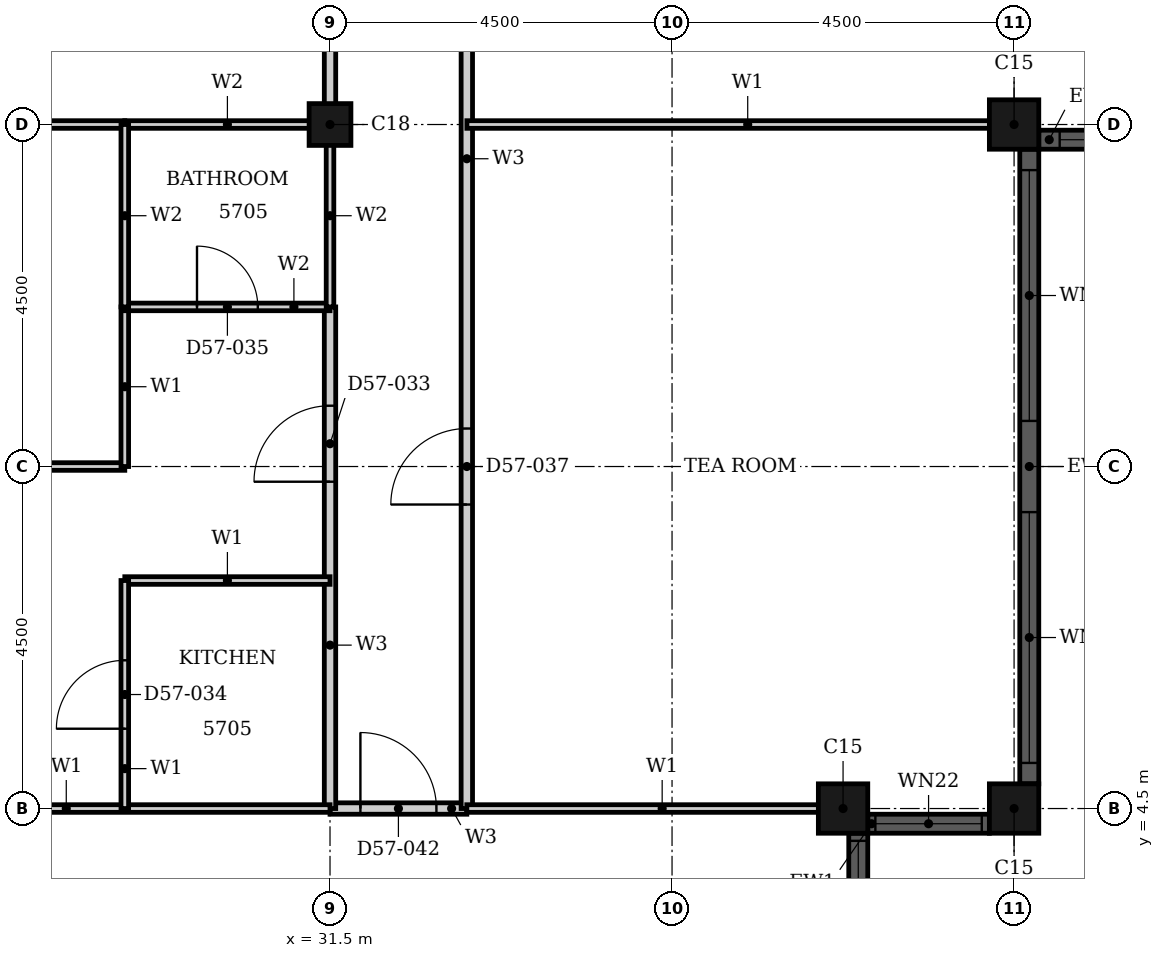
"""IFC4 building model, lengths in metres.
Left out: names, types, materials, properties, quantities, classifications, styles, units other than length and angle.
Written with IfcOpenShell. Run it as: python <this file> out.ifc"""

import sys

from ifc_helpers import new_model, si_unit, direction, frame, frame_2d, origin, origin_2d, place, context, subcontext, project, spatial, rectangle, hollow_rectangle, extrude, element, fill, save


model = new_model("IFC4")
c1 = context("Model", 3, precision=1e-05, world=origin(), true_north=direction((0.0, 1.0)))
c2 = subcontext(c1, "Body", "Model", "MODEL_VIEW")
j1 = project(units=[si_unit("LENGTHUNIT", "METRE"), si_unit("PLANEANGLEUNIT", "RADIAN")], contexts=[c1])
p1 = place(None, origin())
s1 = spatial("IfcSite", under=j1, at=p1, CompositionType="ELEMENT")
p2 = place(p1, origin())
s2 = spatial("IfcBuilding", under=s1, at=p2, CompositionType="ELEMENT")
p3 = place(p2, frame((0.0, 0.0, 225.7)))
s3 = spatial("IfcBuildingStorey", under=s2, at=p3, CompositionType="ELEMENT", Elevation=225.7)
for number, where, z_axis, x_axis in (
    (1, (40.5, 13.5, 0.0), (0.0, 0.0, 1.0), (1.0, 0.0, 0.0)),
    (2, (38.25, 4.5, 0.0), (0.0, 0.0, 1.0), (1.0, 0.0, 0.0)),
    (3, (40.5, 4.5, 0.0), (0.0, 0.0, 1.0), (1.0, 0.0, 0.0)),
):
    element("IfcColumn", number, at=place(p3, frame(where, z_axis=z_axis, x_axis=x_axis)), inside=s3, PredefinedType="COLUMN", context=c2, shape_type="SweptSolid", body=[
        extrude(hollow_rectangle(XDim=0.65, YDim=0.65, WallThickness=0.021, at=origin_2d()), origin(), (0.0, 0.0, 1.0), 3.7),
    ])
p4 = place(p3, frame((31.5, 13.5, 0.0), z_axis=(0.0, 0.0, 1.0), x_axis=(1.0, 0.0, 0.0)))
e4 = element("IfcColumn", 4, at=p4, inside=s3, PredefinedType="COLUMN", context=c2, shape_type="SweptSolid", body=[
    extrude(hollow_rectangle(XDim=0.55, YDim=0.55, WallThickness=0.018, at=origin_2d()), origin(), (0.0, 0.0, 1.0), 3.7),
])
p5 = place(p3, frame((40.825, 13.3, 0.0), z_axis=(0.0, 0.0, 1.0), x_axis=(1.0, 0.0, 0.0)))
e5 = element("IfcWall", 5, at=p5, inside=s3, PredefinedType="SOLIDWALL", context=c2, shape_type="SweptSolid", body=[
    extrude(rectangle(XDim=3.85, YDim=0.25, at=frame_2d((1.925, 0.0))), origin(), (0.0, 0.0, 1.0), 3.7),
])
p6 = place(p5, frame((0.275, 0.0, 0.45)))
e6 = element("IfcOpeningElement", 6, at=p6, cuts=e5, PredefinedType="OPENING", context=c2, shape_type="SweptSolid", body=[
    extrude(rectangle(XDim=3.3, YDim=2.3, at=frame_2d((1.65, 1.15))), frame((0.0, 0.135, 0.0), z_axis=(0.0, -1.0, 0.0), x_axis=(1.0, 0.0, 0.0)), (0.0, 0.0, 1.0), 0.27),
])
p7 = place(p3, frame((38.45, 2.575, 0.0), z_axis=(0.0, 0.0, 1.0), x_axis=(0.0, 1.0, 0.0)))
e7 = element("IfcWall", 7, at=p7, inside=s3, PredefinedType="SOLIDWALL", context=c2, shape_type="SweptSolid", body=[
    extrude(rectangle(XDim=1.6, YDim=0.25, at=frame_2d((0.8, 0.0))), origin(), (0.0, 0.0, 1.0), 3.7),
])
p8 = place(p7, frame((0.1, 0.0, 0.9)))
e8 = element("IfcOpeningElement", 8, at=p8, cuts=e7, PredefinedType="OPENING", context=c2, shape_type="SweptSolid", body=[
    extrude(rectangle(XDim=1.4, YDim=1.85, at=frame_2d((0.7, 0.925))), frame((0.0, 0.135, 0.0), z_axis=(0.0, -1.0, 0.0), x_axis=(1.0, 0.0, 0.0)), (0.0, 0.0, 1.0), 0.27),
])
p9 = place(p3, frame((38.575, 4.3, 0.0), z_axis=(0.0, 0.0, 1.0), x_axis=(1.0, 0.0, 0.0)))
e9 = element("IfcWall", 9, at=p9, inside=s3, PredefinedType="SOLIDWALL", context=c2, shape_type="SweptSolid", body=[
    extrude(rectangle(XDim=1.6, YDim=0.25, at=frame_2d((0.8, 0.0))), origin(), (0.0, 0.0, 1.0), 3.7),
])
p10 = place(p9, frame((0.1, 0.0, 0.9)))
e10 = element("IfcOpeningElement", 10, at=p10, cuts=e9, PredefinedType="OPENING", context=c2, shape_type="SweptSolid", body=[
    extrude(rectangle(XDim=1.4, YDim=1.85, at=frame_2d((0.7, 0.925))), frame((0.0, 0.135, 0.0), z_axis=(0.0, -1.0, 0.0), x_axis=(1.0, 0.0, 0.0)), (0.0, 0.0, 1.0), 0.27),
])
p11 = place(p3, frame((40.7, 4.825, 0.0), z_axis=(0.0, 0.0, 1.0), x_axis=(0.0, 1.0, 0.0)))
e11 = element("IfcWall", 11, at=p11, inside=s3, PredefinedType="SOLIDWALL", context=c2, shape_type="SweptSolid", body=[
    extrude(rectangle(XDim=8.35, YDim=0.25, at=frame_2d((4.175, 0.0))), origin(), (0.0, 0.0, 1.0), 3.7),
])
p12 = place(p11, frame((0.275, 0.0, 0.45)))
e12 = element("IfcOpeningElement", 12, at=p12, cuts=e11, PredefinedType="OPENING", context=c2, shape_type="SweptSolid", body=[
    extrude(rectangle(XDim=3.3, YDim=2.3, at=frame_2d((1.65, 1.15))), frame((0.0, 0.135, 0.0), z_axis=(0.0, -1.0, 0.0), x_axis=(1.0, 0.0, 0.0)), (0.0, 0.0, 1.0), 0.27),
])
p13 = place(p11, frame((4.775, 0.0, 0.45)))
e13 = element("IfcOpeningElement", 13, at=p13, cuts=e11, PredefinedType="OPENING", context=c2, shape_type="SweptSolid", body=[
    extrude(rectangle(XDim=3.3, YDim=2.3, at=frame_2d((1.65, 1.15))), frame((0.0, 0.135, 0.0), z_axis=(0.0, -1.0, 0.0), x_axis=(1.0, 0.0, 0.0)), (0.0, 0.0, 1.0), 0.27),
])
p14 = place(p3, frame((31.5, 4.5, 0.0), z_axis=(0.0, 0.0, 1.0), x_axis=(1.0, 0.0, 0.0)))
e14 = element("IfcWall", 14, at=p14, inside=s3, PredefinedType="PARTITIONING", context=c2, shape_type="SweptSolid", body=[
    extrude(rectangle(XDim=1.8, YDim=0.15, at=frame_2d((0.9, 0.0))), origin(), (0.0, 0.0, 1.0), 3.4),
])
p15 = place(p14, frame((0.4, 0.0, 0.0)))
e15 = element("IfcOpeningElement", 15, at=p15, cuts=e14, PredefinedType="OPENING", context=c2, shape_type="SweptSolid", body=[
    extrude(rectangle(XDim=1.0, YDim=2.1, at=frame_2d((0.5, 1.05))), frame((0.0, 0.085, 0.0), z_axis=(0.0, -1.0, 0.0), x_axis=(1.0, 0.0, 0.0)), (0.0, 0.0, 1.0), 0.17),
])
p16 = place(p3, frame((31.5, 4.5, 0.0), z_axis=(0.0, 0.0, 1.0), x_axis=(0.0, 1.0, 0.0)))
e16 = element("IfcWall", 16, at=p16, inside=s3, PredefinedType="PARTITIONING", context=c2, shape_type="SweptSolid", body=[
    extrude(rectangle(XDim=6.6, YDim=0.15, at=frame_2d((3.3, 0.0))), origin(), (0.0, 0.0, 1.0), 2.68),
])
p17 = place(p16, frame((4.3, 0.0, 0.0)))
e17 = element("IfcOpeningElement", 17, at=p17, cuts=e16, PredefinedType="OPENING", context=c2, shape_type="SweptSolid", body=[
    extrude(rectangle(XDim=1.0, YDim=2.2, at=frame_2d((0.5, 1.1))), frame((0.0, 0.085, 0.0), z_axis=(0.0, -1.0, 0.0), x_axis=(1.0, 0.0, 0.0)), (0.0, 0.0, 1.0), 0.17),
])
p18 = place(p3, frame((31.5, 13.5, 0.0), z_axis=(0.0, 0.0, 1.0), x_axis=(0.0, 1.0, 0.0)))
e18 = element("IfcWall", 18, at=p18, inside=s3, PredefinedType="PARTITIONING", context=c2, shape_type="SweptSolid", body=[
    extrude(rectangle(XDim=7.2, YDim=0.15, at=frame_2d((3.6, 0.0))), origin(), (0.0, 0.0, 1.0), 3.4),
])
p19 = place(p3, frame((33.3, 4.5, 0.0), z_axis=(0.0, 0.0, 1.0), x_axis=(0.0, 1.0, 0.0)))
e19 = element("IfcWall", 19, at=p19, inside=s3, PredefinedType="PARTITIONING", context=c2, shape_type="SweptSolid", body=[
    extrude(rectangle(XDim=16.199, YDim=0.15, at=frame_2d((8.1, 0.0))), origin(), (0.0, 0.0, 1.0), 3.4),
])
p20 = place(p19, frame((12.099, 0.0, 0.0)))
e20 = element("IfcOpeningElement", 20, at=p20, cuts=e19, PredefinedType="OPENING", context=c2, shape_type="SweptSolid", body=[
    extrude(rectangle(XDim=1.0, YDim=2.2, at=frame_2d((0.5, 1.1))), frame((0.0, 0.085, 0.0), z_axis=(0.0, -1.0, 0.0), x_axis=(1.0, 0.0, 0.0)), (0.0, 0.0, 1.0), 0.17),
])
p21 = place(p19, frame((4.0, 0.0, 0.0)))
e21 = element("IfcOpeningElement", 21, at=p21, cuts=e19, PredefinedType="OPENING", context=c2, shape_type="SweptSolid", body=[
    extrude(rectangle(XDim=1.0, YDim=2.1, at=frame_2d((0.5, 1.05))), frame((0.0, 0.085, 0.0), z_axis=(0.0, -1.0, 0.0), x_axis=(1.0, 0.0, 0.0)), (0.0, 0.0, 1.0), 0.17),
])
p22 = place(p3, frame((33.301, 13.5, 0.0), z_axis=(0.0, 0.0, 1.0), x_axis=(1.0, 0.0, 0.0)))
e22 = element("IfcWall", 22, at=p22, inside=s3, PredefinedType="PARTITIONING", context=c2, shape_type="SweptSolid", body=[
    extrude(rectangle(XDim=7.389, YDim=0.1, at=frame_2d((3.694, 0.0))), origin(), (0.0, 0.0, 1.0), 2.48),
])
p23 = place(p3, frame((22.31, 13.5, 0.0), z_axis=(0.0, 0.0, 1.0), x_axis=(1.0, 0.0, 0.0)))
e23 = element("IfcWall", 23, at=p23, inside=s3, PredefinedType="PARTITIONING", context=c2, shape_type="SweptSolid", body=[
    extrude(rectangle(XDim=6.49, YDim=0.1, at=frame_2d((3.245, 0.0))), origin(), (0.0, 0.0, 1.0), 2.48),
])
p24 = place(p3, frame((33.3, 4.5, 0.0), z_axis=(0.0, 0.0, 1.0), x_axis=(1.0, 0.0, 0.0)))
e24 = element("IfcWall", 24, at=p24, inside=s3, PredefinedType="PARTITIONING", context=c2, shape_type="SweptSolid", body=[
    extrude(rectangle(XDim=5.14, YDim=0.1, at=frame_2d((2.57, 0.0))), origin(), (0.0, 0.0, 1.0), 3.4),
])
p25 = place(p3, frame((24.56, 4.5, 0.0), z_axis=(0.0, 0.0, 1.0), x_axis=(1.0, 0.0, 0.0)))
e25 = element("IfcWall", 25, at=p25, inside=s3, PredefinedType="PARTITIONING", context=c2, shape_type="SweptSolid", body=[
    extrude(rectangle(XDim=6.94, YDim=0.1, at=frame_2d((3.47, 0.0))), origin(), (0.0, 0.0, 1.0), 3.4),
])
p26 = place(p3, frame((28.8, 7.5, 0.0), z_axis=(0.0, 0.0, 1.0), x_axis=(1.0, 0.0, 0.0)))
e26 = element("IfcWall", 26, at=p26, inside=s3, PredefinedType="PARTITIONING", context=c2, shape_type="SweptSolid", body=[
    extrude(rectangle(XDim=2.7, YDim=0.1, at=frame_2d((1.35, 0.0))), origin(), (0.0, 0.0, 1.0), 3.4),
])
p27 = place(p3, frame((22.235, 9.0, 0.0), z_axis=(0.0, 0.0, 1.0), x_axis=(1.0, 0.0, 0.0)))
e27 = element("IfcWall", 27, at=p27, inside=s3, PredefinedType="PARTITIONING", context=c2, shape_type="SweptSolid", body=[
    extrude(rectangle(XDim=6.565, YDim=0.1, at=frame_2d((3.282, 0.0))), origin(), (0.0, 0.0, 1.0), 3.4),
])
p28 = place(p27, frame((2.7, 0.0, 0.0)))
e28 = element("IfcOpeningElement", 28, at=p28, cuts=e27, PredefinedType="OPENING", context=c2, shape_type="SweptSolid", body=[
    extrude(rectangle(XDim=0.9, YDim=2.1, at=frame_2d((0.45, 1.05))), frame((0.0, 0.06, 0.0), z_axis=(0.0, -1.0, 0.0), x_axis=(1.0, 0.0, 0.0)), (0.0, 0.0, 1.0), 0.12),
])
p29 = place(p3, frame((28.8, 9.0, 0.0), z_axis=(0.0, 0.0, 1.0), x_axis=(0.0, 1.0, 0.0)))
e29 = element("IfcWall", 29, at=p29, inside=s3, PredefinedType="PARTITIONING", context=c2, shape_type="SweptSolid", body=[
    extrude(rectangle(XDim=2.1, YDim=0.1, at=frame_2d((1.05, 0.0))), origin(), (0.0, 0.0, 1.0), 3.4),
])
p30 = place(p3, frame((28.8, 4.5, 0.0), z_axis=(0.0, 0.0, 1.0), x_axis=(0.0, 1.0, 0.0)))
e30 = element("IfcWall", 30, at=p30, inside=s3, PredefinedType="PARTITIONING", context=c2, shape_type="SweptSolid", body=[
    extrude(rectangle(XDim=3.0, YDim=0.1, at=frame_2d((1.5, 0.0))), origin(), (0.0, 0.0, 1.0), 3.4),
])
p31 = place(p30, frame((1.05, 0.0, 0.0)))
e31 = element("IfcOpeningElement", 31, at=p31, cuts=e30, PredefinedType="OPENING", context=c2, shape_type="SweptSolid", body=[
    extrude(rectangle(XDim=0.9, YDim=2.1, at=frame_2d((0.45, 1.05))), frame((0.0, 0.06, 0.0), z_axis=(0.0, -1.0, 0.0), x_axis=(1.0, 0.0, 0.0)), (0.0, 0.0, 1.0), 0.12),
])
p32 = place(p3, frame((28.8, 11.1, 0.0), z_axis=(0.0, 0.0, 1.0), x_axis=(1.0, 0.0, 0.0)))
e32 = element("IfcWall", 32, at=p32, inside=s3, PredefinedType="PARTITIONING", context=c2, shape_type="SweptSolid", body=[
    extrude(rectangle(XDim=2.7, YDim=0.1, at=frame_2d((1.35, 0.0))), origin(), (0.0, 0.0, 1.0), 3.4),
])
p33 = place(p32, frame((0.95, 0.0, 0.0)))
e33 = element("IfcOpeningElement", 33, at=p33, cuts=e32, PredefinedType="OPENING", context=c2, shape_type="SweptSolid", body=[
    extrude(rectangle(XDim=0.8, YDim=2.1, at=frame_2d((0.4, 1.05))), frame((0.0, 0.06, 0.0), z_axis=(0.0, -1.0, 0.0), x_axis=(1.0, 0.0, 0.0)), (0.0, 0.0, 1.0), 0.12),
])
p34 = place(p3, frame((28.8, 13.5, 0.0), z_axis=(0.0, 0.0, 1.0), x_axis=(1.0, 0.0, 0.0)))
e34 = element("IfcWall", 34, at=p34, inside=s3, PredefinedType="PARTITIONING", context=c2, shape_type="SweptSolid", body=[
    extrude(rectangle(XDim=2.7, YDim=0.1, at=frame_2d((1.35, 0.0))), origin(), (0.0, 0.0, 1.0), 2.48),
])
p35 = place(p3, frame((28.8, 11.1, 0.0), z_axis=(0.0, 0.0, 1.0), x_axis=(0.0, 1.0, 0.0)))
e35 = element("IfcWall", 35, at=p35, inside=s3, PredefinedType="PARTITIONING", context=c2, shape_type="SweptSolid", body=[
    extrude(rectangle(XDim=2.4, YDim=0.1, at=frame_2d((1.2, 0.0))), origin(), (0.0, 0.0, 1.0), 3.4),
])
p36 = place(p3, frame((31.5, 11.1, 0.0), z_axis=(0.0, 0.0, 1.0), x_axis=(0.0, 1.0, 0.0)))
e36 = element("IfcWall", 36, at=p36, inside=s3, PredefinedType="PARTITIONING", context=c2, shape_type="SweptSolid", body=[
    extrude(rectangle(XDim=2.4, YDim=0.1, at=frame_2d((1.2, 0.0))), origin(), (0.0, 0.0, 1.0), 2.68),
])
p37 = place(p6, origin())
e37 = element("IfcWindow", 37, at=p37, inside=s3, PartitioningType="SINGLE_PANEL", PredefinedType="WINDOW", context=c2, shape_type="SweptSolid", body=[
    extrude(rectangle(XDim=3.3, YDim=2.3, at=frame_2d((1.65, 1.15))), frame((0.0, 0.03, 0.0), z_axis=(0.0, -1.0, 0.0), x_axis=(1.0, 0.0, 0.0)), (0.0, 0.0, 1.0), 0.06),
])
fill(e6, e37)
p38 = place(p8, origin())
e38 = element("IfcWindow", 38, at=p38, inside=s3, PartitioningType="SINGLE_PANEL", PredefinedType="WINDOW", context=c2, shape_type="SweptSolid", body=[
    extrude(rectangle(XDim=1.4, YDim=1.85, at=frame_2d((0.7, 0.925))), frame((0.0, 0.03, 0.0), z_axis=(0.0, -1.0, 0.0), x_axis=(1.0, 0.0, 0.0)), (0.0, 0.0, 1.0), 0.06),
])
fill(e8, e38)
p39 = place(p10, origin())
e39 = element("IfcWindow", 39, at=p39, inside=s3, PartitioningType="SINGLE_PANEL", PredefinedType="WINDOW", context=c2, shape_type="SweptSolid", body=[
    extrude(rectangle(XDim=1.4, YDim=1.85, at=frame_2d((0.7, 0.925))), frame((0.0, 0.03, 0.0), z_axis=(0.0, -1.0, 0.0), x_axis=(1.0, 0.0, 0.0)), (0.0, 0.0, 1.0), 0.06),
])
fill(e10, e39)
p40 = place(p12, origin())
e40 = element("IfcWindow", 40, at=p40, inside=s3, PartitioningType="SINGLE_PANEL", PredefinedType="WINDOW", context=c2, shape_type="SweptSolid", body=[
    extrude(rectangle(XDim=3.3, YDim=2.3, at=frame_2d((1.65, 1.15))), frame((0.0, 0.03, 0.0), z_axis=(0.0, -1.0, 0.0), x_axis=(1.0, 0.0, 0.0)), (0.0, 0.0, 1.0), 0.06),
])
fill(e12, e40)
p41 = place(p13, origin())
e41 = element("IfcWindow", 41, at=p41, inside=s3, PartitioningType="SINGLE_PANEL", PredefinedType="WINDOW", context=c2, shape_type="SweptSolid", body=[
    extrude(rectangle(XDim=3.3, YDim=2.3, at=frame_2d((1.65, 1.15))), frame((0.0, 0.03, 0.0), z_axis=(0.0, -1.0, 0.0), x_axis=(1.0, 0.0, 0.0)), (0.0, 0.0, 1.0), 0.06),
])
fill(e13, e41)
p42 = place(p17, origin())
e42 = element("IfcDoor", 42, at=p42, inside=s3, OperationType="SINGLE_SWING_RIGHT", PredefinedType="DOOR", context=c2, shape_type="SweptSolid", body=[
    extrude(rectangle(XDim=1.0, YDim=2.2, at=frame_2d((0.5, 1.1))), frame((0.0, 0.025, 0.0), z_axis=(0.0, -1.0, 0.0), x_axis=(1.0, 0.0, 0.0)), (0.0, 0.0, 1.0), 0.05),
])
fill(e17, e42)
p43 = place(p31, origin())
e43 = element("IfcDoor", 43, at=p43, inside=s3, OperationType="SINGLE_SWING_LEFT", PredefinedType="DOOR", context=c2, shape_type="SweptSolid", body=[
    extrude(rectangle(XDim=0.9, YDim=2.1, at=frame_2d((0.45, 1.05))), frame((0.0, 0.025, 0.0), z_axis=(0.0, -1.0, 0.0), x_axis=(1.0, 0.0, 0.0)), (0.0, 0.0, 1.0), 0.05),
])
fill(e31, e43)
p44 = place(p33, origin())
e44 = element("IfcDoor", 44, at=p44, inside=s3, OperationType="SINGLE_SWING_RIGHT", PredefinedType="DOOR", context=c2, shape_type="SweptSolid", body=[
    extrude(rectangle(XDim=0.8, YDim=2.1, at=frame_2d((0.4, 1.05))), frame((0.0, 0.025, 0.0), z_axis=(0.0, -1.0, 0.0), x_axis=(1.0, 0.0, 0.0)), (0.0, 0.0, 1.0), 0.05),
])
fill(e33, e44)
p45 = place(p21, origin())
e45 = element("IfcDoor", 45, at=p45, inside=s3, OperationType="SINGLE_SWING_RIGHT", PredefinedType="DOOR", context=c2, shape_type="SweptSolid", body=[
    extrude(rectangle(XDim=1.0, YDim=2.1, at=frame_2d((0.5, 1.05))), frame((0.0, 0.025, 0.0), z_axis=(0.0, -1.0, 0.0), x_axis=(1.0, 0.0, 0.0)), (0.0, 0.0, 1.0), 0.05),
])
fill(e21, e45)
p46 = place(p15, origin())
e46 = element("IfcDoor", 46, at=p46, inside=s3, OperationType="SINGLE_SWING_LEFT", PredefinedType="DOOR", context=c2, shape_type="SweptSolid", body=[
    extrude(rectangle(XDim=1.0, YDim=2.1, at=frame_2d((0.5, 1.05))), frame((0.0, 0.025, 0.0), z_axis=(0.0, -1.0, 0.0), x_axis=(1.0, 0.0, 0.0)), (0.0, 0.0, 1.0), 0.05),
])
fill(e15, e46)
save(model, sys.argv[1])
